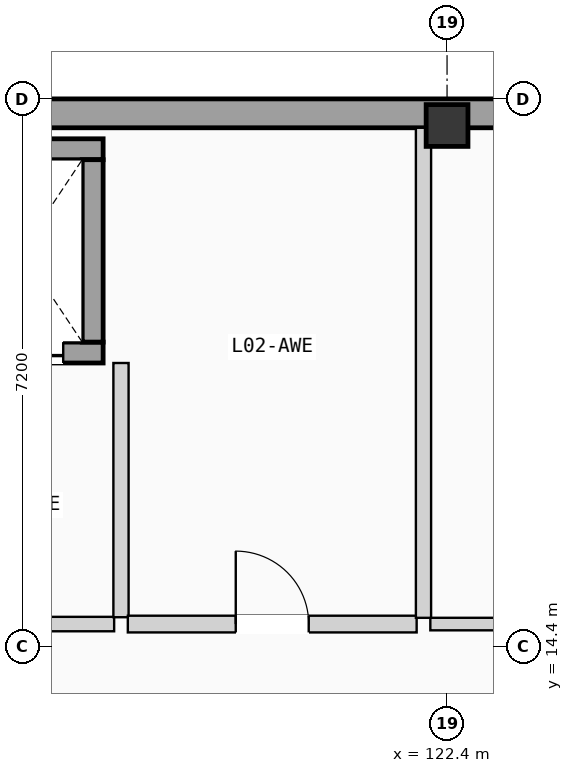
"""IFC4 building model, lengths in metres.
Left out: names, types, materials, properties, quantities, classifications, styles, units other than length and angle.
Written with IfcOpenShell. Run it as: python <this file> out.ifc"""

import sys

from ifc_helpers import new_model, si_unit, direction, frame, frame_2d, origin, origin_2d, place, context, subcontext, project, spatial, rectangle, extrude, element, fill, save


model = new_model("IFC4")
c1 = context("Model", 3, precision=1e-05, world=origin(), true_north=direction((0.0, 1.0)))
c2 = subcontext(c1, "Body", "Model", "MODEL_VIEW")
j1 = project(units=[si_unit("LENGTHUNIT", "METRE"), si_unit("PLANEANGLEUNIT", "RADIAN")], contexts=[c1])
p1 = place(None, origin())
s1 = spatial("IfcSite", under=j1, at=p1, CompositionType="ELEMENT")
p2 = place(p1, origin())
s2 = spatial("IfcBuilding", under=s1, at=p2, CompositionType="ELEMENT")
p3 = place(p2, frame((0.0, 0.0, 8.575)))
s3 = spatial("IfcBuildingStorey", under=s2, at=p3, CompositionType="ELEMENT", Elevation=8.575)
p4 = place(p3, frame((122.4, 21.25, 0.0), z_axis=(0.0, 0.0, 1.0), x_axis=(1.0, 0.0, 0.0)))
e1 = element("IfcColumn", 1, at=p4, inside=s3, PredefinedType="COLUMN", context=c2, shape_type="SweptSolid", body=[
    extrude(rectangle(XDim=0.55, YDim=0.55, at=origin_2d()), origin(), (0.0, 0.0, 1.0), 3.5),
])
p5 = place(p3, frame((108.0, 21.41, 0.0), z_axis=(0.0, 0.0, 1.0), x_axis=(1.0, 0.0, 0.0)))
e2 = element("IfcWall", 2, at=p5, inside=s3, PredefinedType="SOLIDWALL", context=c2, shape_type="SweptSolid", body=[
    extrude(rectangle(XDim=28.8, YDim=0.38, at=frame_2d((14.4, 0.0))), origin(), (0.0, 0.0, 1.0), 3.26),
])
p6 = place(p3, frame((115.725, 18.262, 0.0), z_axis=(0.0, 0.0, 1.0), x_axis=(1.0, 0.0, 0.0)))
e3 = element("IfcWall", 3, at=p6, inside=s3, PredefinedType="SHEAR", context=c2, shape_type="SweptSolid", body=[
    extrude(rectangle(XDim=2.15, YDim=0.275, at=frame_2d((1.075, 0.0))), origin(), (0.0, 0.0, 1.0), 3.26),
])
p7 = place(p6, frame((0.525, 0.0, 0.0)))
e4 = element("IfcOpeningElement", 4, at=p7, cuts=e3, PredefinedType="OPENING", context=c2, shape_type="SweptSolid", body=[
    extrude(rectangle(XDim=1.1, YDim=2.15, at=frame_2d((0.55, 1.075))), frame((0.0, 0.147, 0.0), z_axis=(0.0, -1.0, 0.0), x_axis=(1.0, 0.0, 0.0)), (0.0, 0.0, 1.0), 0.295),
])
p8 = place(p3, frame((115.475, 20.938, 0.0), z_axis=(0.0, 0.0, 1.0), x_axis=(1.0, 0.0, 0.0)))
e5 = element("IfcWall", 5, at=p8, inside=s3, PredefinedType="SHEAR", context=c2, shape_type="SweptSolid", body=[
    extrude(rectangle(XDim=2.4, YDim=0.275, at=frame_2d((1.2, 0.0))), origin(), (0.0, 0.0, 1.0), 3.26),
])
p9 = place(p3, frame((117.738, 18.4, 0.0), z_axis=(0.0, 0.0, 1.0), x_axis=(0.0, 1.0, 0.0)))
e6 = element("IfcWall", 6, at=p9, inside=s3, PredefinedType="SHEAR", context=c2, shape_type="SweptSolid", body=[
    extrude(rectangle(XDim=2.4, YDim=0.275, at=frame_2d((1.2, 0.0))), origin(), (0.0, 0.0, 1.0), 3.26),
])
p10 = place(p3, frame((111.85, 14.69, 0.0), z_axis=(0.0, 0.0, 1.0), x_axis=(1.0, 0.0, 0.0)))
e7 = element("IfcWall", 7, at=p10, inside=s3, PredefinedType="PARTITIONING", context=c2, shape_type="SweptSolid", body=[
    extrude(rectangle(XDim=6.17, YDim=0.19, at=frame_2d((3.085, 0.0))), origin(), (0.0, 0.0, 1.0), 3.22),
])
p11 = place(p10, frame((2.535, 0.0, 0.0)))
e8 = element("IfcOpeningElement", 8, at=p11, cuts=e7, PredefinedType="OPENING", context=c2, shape_type="SweptSolid", body=[
    extrude(rectangle(XDim=1.1, YDim=2.12, at=frame_2d((0.55, 1.06))), frame((0.0, 0.105, 0.0), z_axis=(0.0, -1.0, 0.0), x_axis=(1.0, 0.0, 0.0)), (0.0, 0.0, 1.0), 0.21),
])
p12 = place(p3, frame((118.11, 14.78, 0.0), z_axis=(0.0, 0.0, 1.0), x_axis=(0.0, 1.0, 0.0)))
e9 = element("IfcWall", 9, at=p12, inside=s3, PredefinedType="PLUMBINGWALL", context=c2, shape_type="SweptSolid", body=[
    extrude(rectangle(XDim=3.345, YDim=0.2, at=frame_2d((1.672, 0.0))), origin(), (0.0, 0.0, 1.0), 3.22),
])
p13 = place(p3, frame((118.2, 14.69, 0.0), z_axis=(0.0, 0.0, 1.0), x_axis=(1.0, 0.0, 0.0)))
e10 = element("IfcWall", 10, at=p13, inside=s3, PredefinedType="PLUMBINGWALL", context=c2, shape_type="SweptSolid", body=[
    extrude(rectangle(XDim=3.8, YDim=0.22, at=frame_2d((1.9, 0.0))), origin(), (0.0, 0.0, 1.0), 3.22),
])
p14 = place(p13, frame((1.42, 0.0, 0.0)))
e11 = element("IfcOpeningElement", 11, at=p14, cuts=e10, PredefinedType="OPENING", context=c2, shape_type="SweptSolid", body=[
    extrude(rectangle(XDim=0.96, YDim=2.05, at=frame_2d((0.48, 1.025))), frame((0.0, 0.12, 0.0), z_axis=(0.0, -1.0, 0.0), x_axis=(1.0, 0.0, 0.0)), (0.0, 0.0, 1.0), 0.24),
])
p15 = place(p3, frame((122.18, 14.69, 0.0), z_axis=(0.0, 0.0, 1.0), x_axis=(1.0, 0.0, 0.0)))
e12 = element("IfcWall", 12, at=p15, inside=s3, PredefinedType="PARTITIONING", context=c2, shape_type="SweptSolid", body=[
    extrude(rectangle(XDim=8.54, YDim=0.165, at=frame_2d((4.27, 0.0))), origin(), (0.0, 0.0, 1.0), 3.22),
])
p16 = place(p15, frame((3.76, 0.0, 0.0)))
e13 = element("IfcOpeningElement", 13, at=p16, cuts=e12, PredefinedType="OPENING", context=c2, shape_type="SweptSolid", body=[
    extrude(rectangle(XDim=1.02, YDim=2.16, at=frame_2d((0.51, 1.08))), frame((0.0, 0.093, 0.0), z_axis=(0.0, -1.0, 0.0), x_axis=(1.0, 0.0, 0.0)), (0.0, 0.0, 1.0), 0.185),
])
p17 = place(p3, frame((122.09, 14.772, 0.0), z_axis=(0.0, 0.0, 1.0), x_axis=(0.0, 1.0, 0.0)))
e14 = element("IfcWall", 14, at=p17, inside=s3, PredefinedType="PLUMBINGWALL", context=c2, shape_type="SweptSolid", body=[
    extrude(rectangle(XDim=6.448, YDim=0.2, at=frame_2d((3.224, 0.0))), origin(), (0.0, 0.0, 1.0), 2.63),
])
p18 = place(p7, origin())
e15 = element("IfcDoor", 15, at=p18, inside=s3, OperationType="SLIDING_TO_LEFT", PredefinedType="DOOR", context=c2, shape_type="SweptSolid", body=[
    extrude(rectangle(XDim=1.1, YDim=2.15, at=frame_2d((0.55, 1.075))), frame((0.0, 0.025, 0.0), z_axis=(0.0, -1.0, 0.0), x_axis=(1.0, 0.0, 0.0)), (0.0, 0.0, 1.0), 0.05),
])
fill(e4, e15)
p19 = place(p14, origin())
e16 = element("IfcDoor", 16, at=p19, inside=s3, OperationType="SINGLE_SWING_LEFT", PredefinedType="DOOR", context=c2, shape_type="SweptSolid", body=[
    extrude(rectangle(XDim=0.96, YDim=2.05, at=frame_2d((0.48, 1.025))), frame((0.0, 0.025, 0.0), z_axis=(0.0, -1.0, 0.0), x_axis=(1.0, 0.0, 0.0)), (0.0, 0.0, 1.0), 0.05),
])
fill(e11, e16)
save(model, sys.argv[1])
